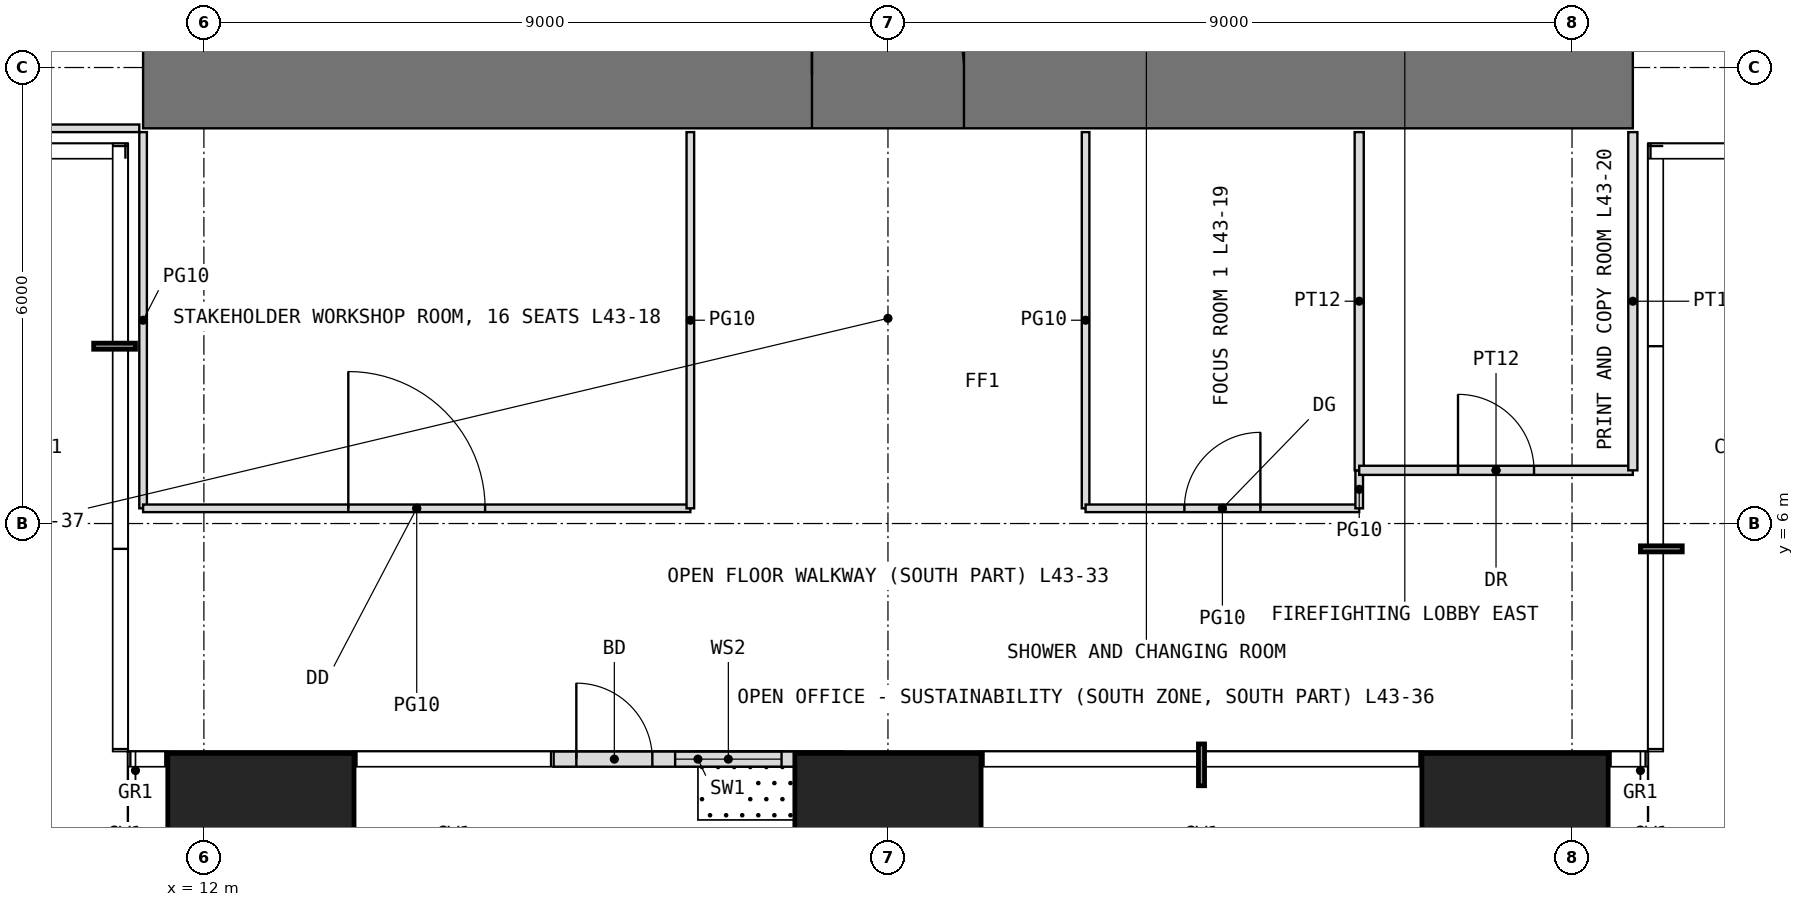
"""IFC4 building model, lengths in metres.
Left out: names, types, materials, properties, quantities, classifications, styles, units other than length and angle.
Written with IfcOpenShell. Run it as: python <this file> out.ifc"""

import sys

from ifc_helpers import new_model, si_unit, direction, frame, frame_2d, origin, origin_2d, place, context, subcontext, project, spatial, rectangle, extrude, element, fill, save


model = new_model("IFC4")
c1 = context("Model", 3, precision=1e-05, world=origin(), true_north=direction((0.0, 1.0)))
c2 = subcontext(c1, "Body", "Model", "MODEL_VIEW")
j1 = project(units=[si_unit("LENGTHUNIT", "METRE"), si_unit("PLANEANGLEUNIT", "RADIAN")], contexts=[c1])
p1 = place(None, origin())
s1 = spatial("IfcSite", under=j1, at=p1, CompositionType="ELEMENT")
p2 = place(p1, origin())
s2 = spatial("IfcBuilding", under=s1, at=p2, CompositionType="ELEMENT")
p3 = place(p2, frame((0.0, 0.0, 182.5)))
s3 = spatial("IfcBuildingStorey", under=s2, at=p3, CompositionType="ELEMENT", Elevation=182.5)
for number, where, z_axis, x_axis in (
    (1, (12.75, 1.75, 0.0), (0.0, 0.0, 1.0), (1.0, 0.0, 0.0)),
    (2, (21.0, 1.75, 0.0), (0.0, 0.0, 1.0), (1.0, 0.0, 0.0)),
    (3, (29.25, 1.75, 0.0), (0.0, 0.0, 1.0), (1.0, 0.0, 0.0)),
):
    element("IfcColumn", number, at=place(p3, frame(where, z_axis=z_axis, x_axis=x_axis)), inside=s3, PredefinedType="COLUMN", context=c2, shape_type="SweptSolid", body=[
        extrude(rectangle(XDim=2.45, YDim=2.45, at=origin_2d()), origin(), (0.0, 0.0, 1.0), 4.0),
    ])
p4 = place(p3, frame((16.6, 2.9, 0.0), z_axis=(0.0, 0.0, 1.0), x_axis=(1.0, 0.0, 0.0)))
e4 = element("IfcWall", 4, at=p4, inside=s3, PredefinedType="USERDEFINED", context=c2, shape_type="SweptSolid", body=[
    extrude(rectangle(XDim=3.8, YDim=0.2, at=frame_2d((1.9, 0.0))), origin(), (0.0, 0.0, 1.0), 3.75),
])
p5 = place(p4, frame((0.3, 0.0, 0.0)))
e5 = element("IfcOpeningElement", 5, at=p5, cuts=e4, PredefinedType="OPENING", context=c2, shape_type="SweptSolid", body=[
    extrude(rectangle(XDim=1.0, YDim=2.4, at=frame_2d((0.5, 1.2))), frame((0.0, 0.11, 0.0), z_axis=(0.0, -1.0, 0.0), x_axis=(1.0, 0.0, 0.0)), (0.0, 0.0, 1.0), 0.22),
])
p6 = place(p4, frame((1.6, 0.0, 0.3)))
e6 = element("IfcOpeningElement", 6, at=p6, cuts=e4, PredefinedType="OPENING", context=c2, shape_type="SweptSolid", body=[
    extrude(rectangle(XDim=1.4, YDim=2.7, at=frame_2d((0.7, 1.35))), frame((0.0, 0.11, 0.0), z_axis=(0.0, -1.0, 0.0), x_axis=(1.0, 0.0, 0.0)), (0.0, 0.0, 1.0), 0.22),
])
p7 = place(p3, frame((11.2, 11.9, -0.05), z_axis=(0.0, 0.0, 1.0), x_axis=(1.0, 0.0, 0.0)))
e7 = element("IfcWall", 7, at=p7, inside=s3, PredefinedType="SHEAR", context=c2, shape_type="SweptSolid", body=[
    extrude(rectangle(XDim=19.6, YDim=1.4, at=frame_2d((9.8, 0.0))), origin(), (0.0, 0.0, 1.0), 4.0),
])
p8 = place(p7, frame((8.8, 0.0, 0.05)))
e8 = element("IfcOpeningElement", 8, at=p8, cuts=e7, PredefinedType="OPENING", context=c2, shape_type="SweptSolid", body=[
    extrude(rectangle(XDim=2.0, YDim=2.2, at=frame_2d((1.0, 1.1))), frame((0.0, 0.71, 0.0), z_axis=(0.0, -1.0, 0.0), x_axis=(1.0, 0.0, 0.0)), (0.0, 0.0, 1.0), 1.42),
])
p9 = place(p3, frame((7.0, 11.2, 0.0), z_axis=(0.0, 0.0, 1.0), x_axis=(1.0, 0.0, 0.0)))
e9 = element("IfcWall", 9, at=p9, inside=s3, PredefinedType="PARTITIONING", context=c2, shape_type="SweptSolid", body=[
    extrude(rectangle(XDim=4.15, YDim=0.1, at=frame_2d((2.075, 0.0))), origin(), (0.0, 0.0, 1.0), 3.75),
])
p10 = place(p3, frame((11.2, 6.2, 0.0), z_axis=(0.0, 0.0, 1.0), x_axis=(0.0, 1.0, 0.0)))
e10 = element("IfcWall", 10, at=p10, inside=s3, PredefinedType="PARTITIONING", context=c2, shape_type="SweptSolid", body=[
    extrude(rectangle(XDim=4.95, YDim=0.1, at=frame_2d((2.475, 0.0))), origin(), (0.0, 0.0, 1.0), 3.75),
])
p11 = place(p3, frame((11.2, 6.2, 0.0), z_axis=(0.0, 0.0, 1.0), x_axis=(1.0, 0.0, 0.0)))
e11 = element("IfcWall", 11, at=p11, inside=s3, PredefinedType="PARTITIONING", context=c2, shape_type="SweptSolid", body=[
    extrude(rectangle(XDim=7.2, YDim=0.1, at=frame_2d((3.6, 0.0))), origin(), (0.0, 0.0, 1.0), 3.75),
])
p12 = place(p11, frame((2.7, 0.0, 0.0)))
e12 = element("IfcOpeningElement", 12, at=p12, cuts=e11, PredefinedType="OPENING", context=c2, shape_type="SweptSolid", body=[
    extrude(rectangle(XDim=1.8, YDim=2.4, at=frame_2d((0.9, 1.2))), frame((0.0, 0.06, 0.0), z_axis=(0.0, -1.0, 0.0), x_axis=(1.0, 0.0, 0.0)), (0.0, 0.0, 1.0), 0.12),
])
for number, where, z_axis, x_axis in (
    (13, (18.4, 6.2, 0.0), (0.0, 0.0, 1.0), (0.0, 1.0, 0.0)),
    (14, (23.6, 6.2, 0.0), (0.0, 0.0, 1.0), (0.0, 1.0, 0.0)),
):
    element("IfcWall", number, at=place(p3, frame(where, z_axis=z_axis, x_axis=x_axis)), inside=s3, PredefinedType="PARTITIONING", context=c2, shape_type="SweptSolid", body=[
        extrude(rectangle(XDim=4.95, YDim=0.1, at=frame_2d((2.475, 0.0))), origin(), (0.0, 0.0, 1.0), 3.75),
    ])
p13 = place(p3, frame((23.6, 6.2, 0.0), z_axis=(0.0, 0.0, 1.0), x_axis=(1.0, 0.0, 0.0)))
e15 = element("IfcWall", 15, at=p13, inside=s3, PredefinedType="PARTITIONING", context=c2, shape_type="SweptSolid", body=[
    extrude(rectangle(XDim=3.6, YDim=0.1, at=frame_2d((1.8, 0.0))), origin(), (0.0, 0.0, 1.0), 3.75),
])
p14 = place(p13, frame((1.3, 0.0, 0.0)))
e16 = element("IfcOpeningElement", 16, at=p14, cuts=e15, PredefinedType="OPENING", context=c2, shape_type="SweptSolid", body=[
    extrude(rectangle(XDim=1.0, YDim=2.4, at=frame_2d((0.5, 1.2))), frame((0.0, 0.06, 0.0), z_axis=(0.0, -1.0, 0.0), x_axis=(1.0, 0.0, 0.0)), (0.0, 0.0, 1.0), 0.12),
])
p15 = place(p3, frame((27.2, 6.2, 0.0), z_axis=(0.0, 0.0, 1.0), x_axis=(0.0, 1.0, 0.0)))
e17 = element("IfcWall", 17, at=p15, inside=s3, PredefinedType="PARTITIONING", context=c2, shape_type="SweptSolid", body=[
    extrude(rectangle(XDim=0.5, YDim=0.1, at=frame_2d((0.25, 0.0))), origin(), (0.0, 0.0, 1.0), 3.75),
])
p16 = place(p3, frame((27.2, 6.7, 0.0), z_axis=(0.0, 0.0, 1.0), x_axis=(0.0, 1.0, 0.0)))
e18 = element("IfcWall", 18, at=p16, inside=s3, PredefinedType="PARTITIONING", context=c2, shape_type="SweptSolid", body=[
    extrude(rectangle(XDim=4.45, YDim=0.12, at=frame_2d((2.225, 0.0))), origin(), (0.0, 0.0, 1.0), 3.75),
])
p17 = place(p3, frame((27.2, 6.7, 0.0), z_axis=(0.0, 0.0, 1.0), x_axis=(1.0, 0.0, 0.0)))
e19 = element("IfcWall", 19, at=p17, inside=s3, PredefinedType="PARTITIONING", context=c2, shape_type="SweptSolid", body=[
    extrude(rectangle(XDim=3.6, YDim=0.12, at=frame_2d((1.8, 0.0))), origin(), (0.0, 0.0, 1.0), 3.75),
])
p18 = place(p17, frame((1.3, 0.0, 0.0)))
e20 = element("IfcOpeningElement", 20, at=p18, cuts=e19, PredefinedType="OPENING", context=c2, shape_type="SweptSolid", body=[
    extrude(rectangle(XDim=1.0, YDim=2.2, at=frame_2d((0.5, 1.1))), frame((0.0, 0.07, 0.0), z_axis=(0.0, -1.0, 0.0), x_axis=(1.0, 0.0, 0.0)), (0.0, 0.0, 1.0), 0.14),
])
p19 = place(p3, frame((30.8, 6.7, 0.0), z_axis=(0.0, 0.0, 1.0), x_axis=(0.0, 1.0, 0.0)))
e21 = element("IfcWall", 21, at=p19, inside=s3, PredefinedType="PARTITIONING", context=c2, shape_type="SweptSolid", body=[
    extrude(rectangle(XDim=4.45, YDim=0.12, at=frame_2d((2.225, 0.0))), origin(), (0.0, 0.0, 1.0), 3.75),
])
p20 = place(p5, origin())
e22 = element("IfcDoor", 22, at=p20, inside=s3, OperationType="SINGLE_SWING_LEFT", PredefinedType="DOOR", context=c2, shape_type="SweptSolid", body=[
    extrude(rectangle(XDim=1.0, YDim=2.4, at=frame_2d((0.5, 1.2))), frame((0.0, 0.025, 0.0), z_axis=(0.0, -1.0, 0.0), x_axis=(1.0, 0.0, 0.0)), (0.0, 0.0, 1.0), 0.05),
])
fill(e5, e22)
p21 = place(p6, origin())
e23 = element("IfcWindow", 23, at=p21, inside=s3, PartitioningType="SINGLE_PANEL", PredefinedType="WINDOW", context=c2, shape_type="SweptSolid", body=[
    extrude(rectangle(XDim=1.4, YDim=2.7, at=frame_2d((0.7, 1.35))), frame((0.0, 0.03, 0.0), z_axis=(0.0, -1.0, 0.0), x_axis=(1.0, 0.0, 0.0)), (0.0, 0.0, 1.0), 0.06),
])
fill(e6, e23)
p22 = place(p8, origin())
e24 = element("IfcDoor", 24, at=p22, inside=s3, OperationType="DOUBLE_DOOR_SINGLE_SWING", PredefinedType="DOOR", context=c2, shape_type="SweptSolid", body=[
    extrude(rectangle(XDim=2.0, YDim=2.2, at=frame_2d((1.0, 1.1))), frame((0.0, 0.025, 0.0), z_axis=(0.0, -1.0, 0.0), x_axis=(1.0, 0.0, 0.0)), (0.0, 0.0, 1.0), 0.05),
])
fill(e8, e24)
p23 = place(p12, origin())
e25 = element("IfcDoor", 25, at=p23, inside=s3, OperationType="DOUBLE_DOOR_SINGLE_SWING", PredefinedType="DOOR", context=c2, shape_type="SweptSolid", body=[
    extrude(rectangle(XDim=1.8, YDim=2.4, at=frame_2d((0.9, 1.2))), frame((0.0, 0.025, 0.0), z_axis=(0.0, -1.0, 0.0), x_axis=(1.0, 0.0, 0.0)), (0.0, 0.0, 1.0), 0.05),
])
fill(e12, e25)
p24 = place(p14, origin())
e26 = element("IfcDoor", 26, at=p24, inside=s3, OperationType="SINGLE_SWING_RIGHT", PredefinedType="DOOR", context=c2, shape_type="SweptSolid", body=[
    extrude(rectangle(XDim=1.0, YDim=2.4, at=frame_2d((0.5, 1.2))), frame((0.0, 0.025, 0.0), z_axis=(0.0, -1.0, 0.0), x_axis=(1.0, 0.0, 0.0)), (0.0, 0.0, 1.0), 0.05),
])
fill(e16, e26)
p25 = place(p18, origin())
e27 = element("IfcDoor", 27, at=p25, inside=s3, OperationType="SINGLE_SWING_LEFT", PredefinedType="DOOR", context=c2, shape_type="SweptSolid", body=[
    extrude(rectangle(XDim=1.0, YDim=2.2, at=frame_2d((0.5, 1.1))), frame((0.0, 0.025, 0.0), z_axis=(0.0, -1.0, 0.0), x_axis=(1.0, 0.0, 0.0)), (0.0, 0.0, 1.0), 0.05),
])
fill(e20, e27)
save(model, sys.argv[1])
